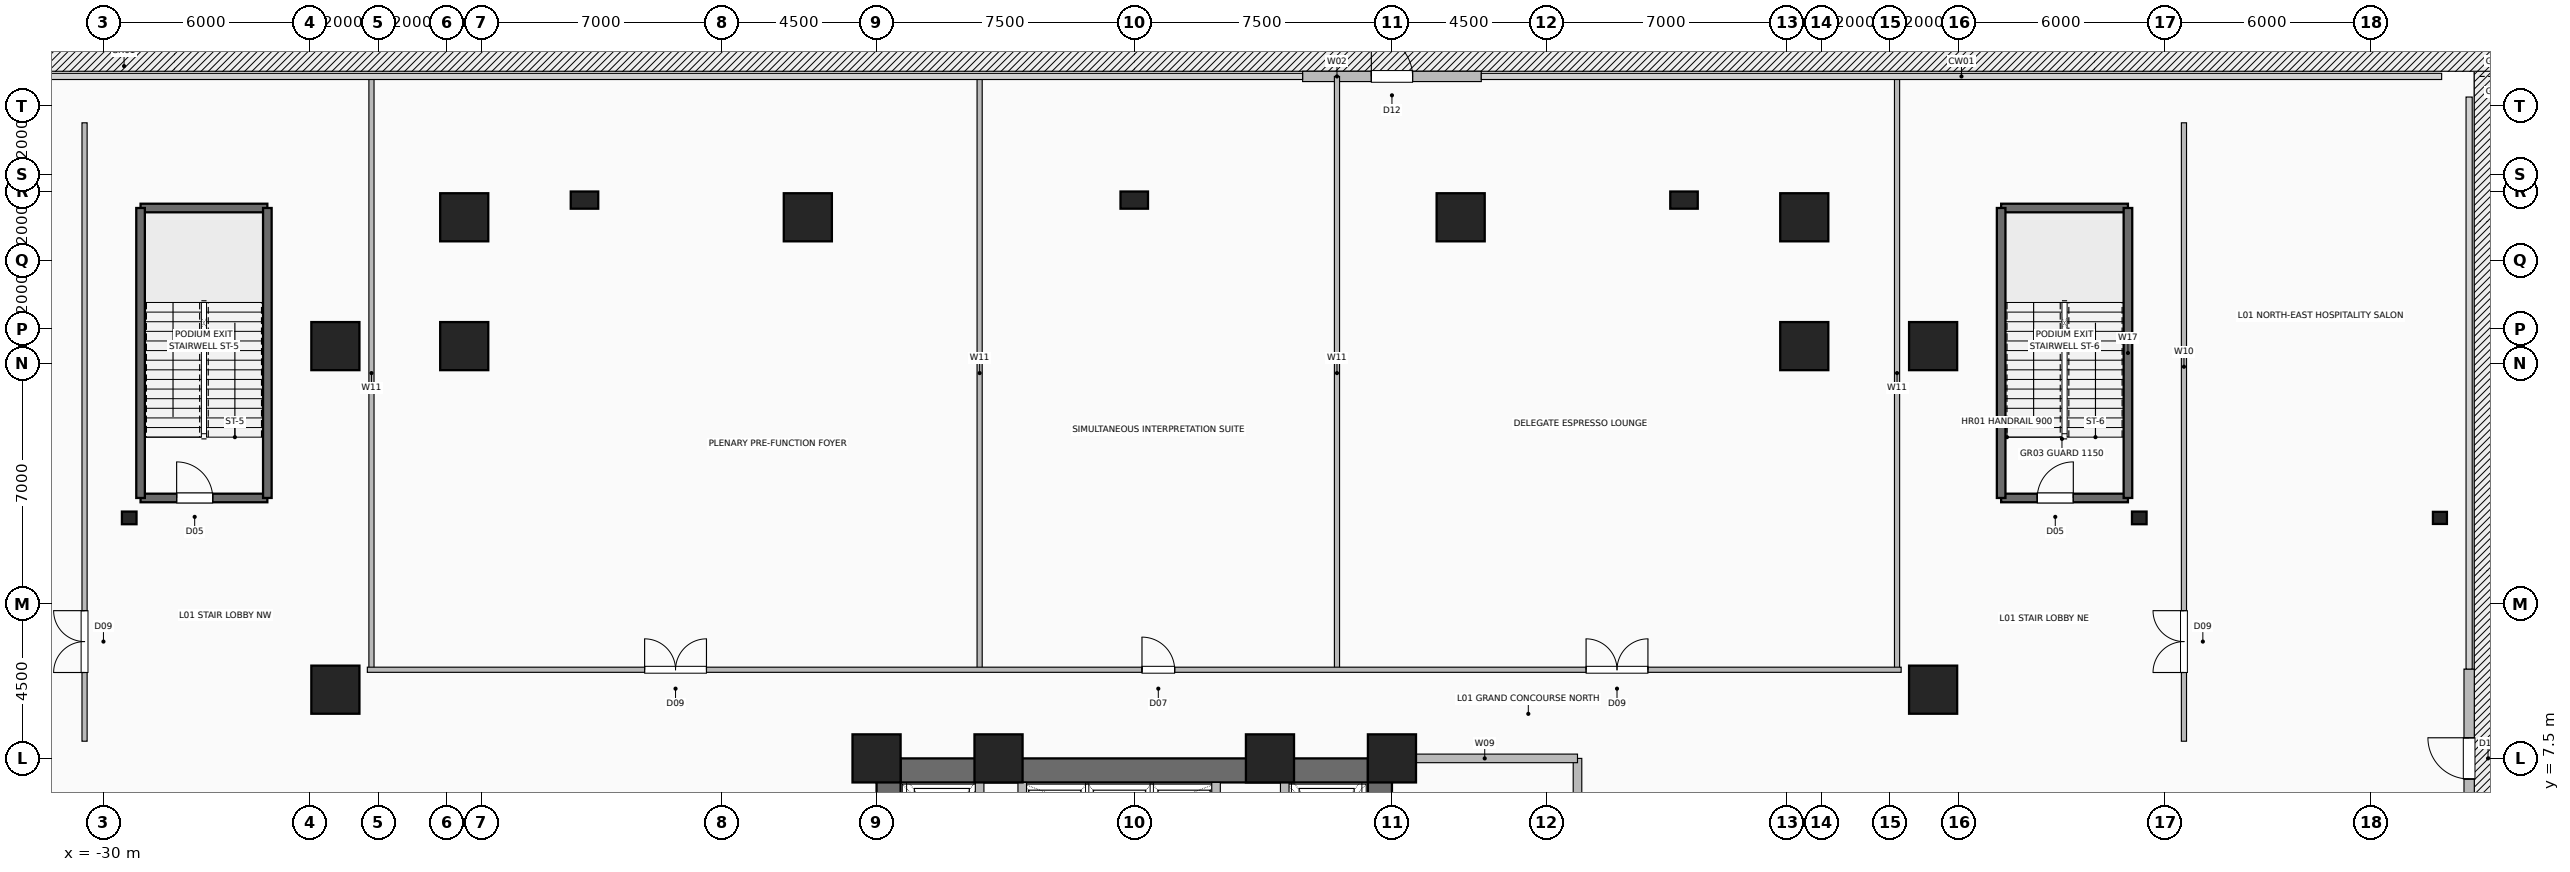
"""IFC4 building model, lengths in metres.
Left out: names, types, materials, properties, quantities, classifications, styles, units other than length and angle.
Written with IfcOpenShell. Run it as: python <this file> out.ifc"""

import sys

from ifc_helpers import new_model, si_unit, direction, frame, frame_2d, origin, origin_2d, place, context, subcontext, project, spatial, rectangle, hollow_rectangle, i_section, extrude, element, fill, save


model = new_model("IFC4")
c1 = context("Model", 3, precision=1e-05, world=origin(), true_north=direction((0.0, 1.0)))
c2 = subcontext(c1, "Body", "Model", "MODEL_VIEW")
j1 = project(units=[si_unit("LENGTHUNIT", "METRE"), si_unit("PLANEANGLEUNIT", "RADIAN")], contexts=[c1])
p1 = place(None, origin())
s1 = spatial("IfcSite", under=j1, at=p1, CompositionType="ELEMENT")
p2 = place(p1, origin())
s2 = spatial("IfcBuilding", under=s1, at=p2, CompositionType="ELEMENT")
p3 = place(p2, frame((0.0, 0.0, 5.4)))
s3 = spatial("IfcBuildingStorey", under=s2, at=p3, CompositionType="ELEMENT", Elevation=5.4)
for number, where, z_axis, x_axis in (
    (1, (7.5, 7.5, 0.0), (0.0, 0.0, 1.0), (1.0, 0.0, 0.0)),
    (2, (3.95, 7.5, 0.0), (0.0, 0.0, 1.0), (1.0, 0.0, 0.0)),
    (3, (-3.95, 7.5, 0.0), (0.0, 0.0, 1.0), (1.0, 0.0, 0.0)),
    (4, (-7.5, 7.5, 0.0), (0.0, 0.0, 1.0), (1.0, 0.0, 0.0)),
    (5, (-19.5, 23.25, 0.0), (0.0, 0.0, 1.0), (1.0, 0.0, 0.0)),
    (6, (-9.5, 23.25, 0.0), (0.0, 0.0, 1.0), (1.0, 0.0, 0.0)),
    (7, (9.5, 23.25, 0.0), (0.0, 0.0, 1.0), (1.0, 0.0, 0.0)),
    (8, (19.5, 23.25, 0.0), (0.0, 0.0, 1.0), (1.0, 0.0, 0.0)),
    (9, (-23.25, 9.5, 0.0), (0.0, 0.0, 1.0), (1.0, 0.0, 0.0)),
    (10, (-23.25, 19.5, 0.0), (0.0, 0.0, 1.0), (1.0, 0.0, 0.0)),
    (11, (23.25, 9.5, 0.0), (0.0, 0.0, 1.0), (1.0, 0.0, 0.0)),
    (12, (23.25, 19.5, 0.0), (0.0, 0.0, 1.0), (1.0, 0.0, 0.0)),
    (13, (19.5, 19.5, 0.0), (0.0, 0.0, 1.0), (1.0, 0.0, 0.0)),
    (14, (-19.5, 19.5, 0.0), (0.0, 0.0, 1.0), (1.0, 0.0, 0.0)),
):
    element("IfcColumn", number, at=place(p3, frame(where, z_axis=z_axis, x_axis=x_axis)), inside=s3, PredefinedType="COLUMN", context=c2, shape_type="SweptSolid", body=[
        extrude(hollow_rectangle(XDim=1.4, YDim=1.4, WallThickness=0.06, at=origin_2d()), origin(), (0.0, 0.0, 1.0), 5.4),
    ])
for number, where, z_axis, x_axis in (
    (15, (-29.25, 14.5, 0.0), (0.0, 0.0, 1.0), (1.0, 0.0, 0.0)),
    (16, (29.25, 14.5, 0.0), (0.0, 0.0, 1.0), (1.0, 0.0, 0.0)),
):
    element("IfcColumn", number, at=place(p3, frame(where, z_axis=z_axis, x_axis=x_axis)), inside=s3, PredefinedType="COLUMN", context=c2, shape_type="SweptSolid", body=[
        extrude(i_section(OverallWidth=0.368, OverallDepth=0.425, WebThickness=0.03, FlangeThickness=0.048, FilletRadius=0.02, at=origin_2d()), origin(), (0.0, 0.0, 1.0), 5.4),
    ])
p4 = place(p3, frame((38.0, 14.5, -0.4), z_axis=(0.0, 0.0, 1.0), x_axis=(1.0, 0.0, 0.0)))
e17 = element("IfcColumn", 17, at=p4, inside=s3, PredefinedType="COLUMN", context=c2, shape_type="SweptSolid", body=[
    extrude(i_section(OverallWidth=0.352, OverallDepth=0.407, WebThickness=0.025, FlangeThickness=0.04, FilletRadius=0.02, at=origin_2d()), origin(), (0.0, 0.0, 1.0), 5.4),
])
for number, where, z_axis, x_axis in (
    (18, (-16.0, 23.75, 0.0), (0.0, 0.0, 1.0), (1.0, 0.0, 0.0)),
    (19, (0.0, 23.75, 0.0), (0.0, 0.0, 1.0), (1.0, 0.0, 0.0)),
    (20, (16.0, 23.75, 0.0), (0.0, 0.0, 1.0), (1.0, 0.0, 0.0)),
):
    element("IfcColumn", number, at=place(p3, frame(where, z_axis=z_axis, x_axis=x_axis)), inside=s3, PredefinedType="PILASTER", context=c2, shape_type="SweptSolid", body=[
        extrude(rectangle(XDim=0.5, YDim=0.8, at=origin_2d()), origin(), (0.0, 0.0, 1.0), 5.4),
    ])
p5 = place(p3, frame((38.85, 4.9, 0.0), z_axis=(0.0, 0.0, 1.0), x_axis=(0.0, 1.0, 0.0)))
e21 = element("IfcWall", 21, at=p5, inside=s3, PredefinedType="SOLIDWALL", context=c2, shape_type="SweptSolid", body=[
    extrude(rectangle(XDim=5.2, YDim=0.3, at=frame_2d((2.6, 0.0))), origin(), (0.0, 0.0, 1.0), 5.0),
])
p6 = place(p5, frame((2.0, 0.0, 0.0)))
e22 = element("IfcOpeningElement", 22, at=p6, cuts=e21, PredefinedType="OPENING", context=c2, shape_type="SweptSolid", body=[
    extrude(rectangle(XDim=1.2, YDim=2.25, at=frame_2d((0.6, 1.125))), frame((0.0, 0.16, 0.0), z_axis=(0.0, -1.0, 0.0), x_axis=(1.0, 0.0, 0.0)), (0.0, 0.0, 1.0), 0.32),
])
p7 = place(p3, frame((4.9, 27.35, 0.0), z_axis=(0.0, 0.0, 1.0), x_axis=(1.0, 0.0, 0.0)))
e23 = element("IfcWall", 23, at=p7, inside=s3, PredefinedType="SOLIDWALL", context=c2, shape_type="SweptSolid", body=[
    extrude(rectangle(XDim=5.2, YDim=0.3, at=frame_2d((2.6, 0.0))), origin(), (0.0, 0.0, 1.0), 5.0),
])
p8 = place(p7, frame((2.0, 0.0, 0.0)))
e24 = element("IfcOpeningElement", 24, at=p8, cuts=e23, PredefinedType="OPENING", context=c2, shape_type="SweptSolid", body=[
    extrude(rectangle(XDim=1.2, YDim=2.25, at=frame_2d((0.6, 1.125))), frame((0.0, 0.16, 0.0), z_axis=(0.0, -1.0, 0.0), x_axis=(1.0, 0.0, 0.0)), (0.0, 0.0, 1.0), 0.32),
])
p9 = place(p3, frame((-7.5, 7.15, 0.0), z_axis=(0.0, 0.0, 1.0), x_axis=(1.0, 0.0, 0.0)))
e25 = element("IfcWall", 25, at=p9, inside=s3, PredefinedType="SHEAR", context=c2, shape_type="SweptSolid", body=[
    extrude(rectangle(XDim=15.0, YDim=0.7, at=frame_2d((7.5, 0.0))), origin(), (0.0, 0.0, 1.0), 5.0),
])
p10 = place(p3, frame((-7.15, -7.5, 0.0), z_axis=(0.0, 0.0, 1.0), x_axis=(0.0, 1.0, 0.0)))
e26 = element("IfcWall", 26, at=p10, inside=s3, PredefinedType="SHEAR", context=c2, shape_type="SweptSolid", body=[
    extrude(rectangle(XDim=15.0, YDim=0.7, at=frame_2d((7.5, 0.0))), origin(), (0.0, 0.0, 1.0), 5.0),
])
p11 = place(p10, frame((9.5, 0.0, 0.0)))
e27 = element("IfcOpeningElement", 27, at=p11, cuts=e26, PredefinedType="OPENING", context=c2, shape_type="SweptSolid", body=[
    extrude(rectangle(XDim=1.0, YDim=2.08, at=frame_2d((0.5, 1.04))), frame((0.0, 0.36, 0.0), z_axis=(0.0, -1.0, 0.0), x_axis=(1.0, 0.0, 0.0)), (0.0, 0.0, 1.0), 0.72),
])
p12 = place(p3, frame((7.15, -7.5, 0.0), z_axis=(0.0, 0.0, 1.0), x_axis=(0.0, 1.0, 0.0)))
e28 = element("IfcWall", 28, at=p12, inside=s3, PredefinedType="SHEAR", context=c2, shape_type="SweptSolid", body=[
    extrude(rectangle(XDim=15.0, YDim=0.7, at=frame_2d((7.5, 0.0))), origin(), (0.0, 0.0, 1.0), 5.0),
])
p13 = place(p12, frame((12.6, 0.0, 0.0)))
e29 = element("IfcOpeningElement", 29, at=p13, cuts=e28, PredefinedType="OPENING", context=c2, shape_type="SweptSolid", body=[
    extrude(rectangle(XDim=1.2, YDim=2.2, at=frame_2d((0.6, 1.1))), frame((0.0, 0.36, 0.0), z_axis=(0.0, -1.0, 0.0), x_axis=(1.0, 0.0, 0.0)), (0.0, 0.0, 1.0), 0.72),
])
for number, where, z_axis, x_axis in (
    (30, (-3.26, 4.58, 0.0), (0.0, 0.0, 1.0), (0.0, 1.0, 0.0)),
    (31, (2.38, 4.58, 0.0), (0.0, 0.0, 1.0), (0.0, 1.0, 0.0)),
):
    element("IfcWall", number, at=place(p3, frame(where, z_axis=z_axis, x_axis=x_axis)), inside=s3, PredefinedType="SHEAR", context=c2, shape_type="SweptSolid", body=[
        extrude(rectangle(XDim=2.22, YDim=0.25, at=frame_2d((1.11, 0.0))), origin(), (0.0, 0.0, 1.0), 5.0),
    ])
p14 = place(p3, frame((-4.5, 4.35, 0.0), z_axis=(0.0, 0.0, 1.0), x_axis=(0.0, 1.0, 0.0)))
e32 = element("IfcWall", 32, at=p14, inside=s3, PredefinedType="SHEAR", context=c2, shape_type="SweptSolid", body=[
    extrude(rectangle(XDim=2.85, YDim=0.25, at=frame_2d((1.425, 0.0))), origin(), (0.0, 0.0, 1.0), 5.0),
])
p15 = place(p3, frame((4.38, 4.3, 0.0), z_axis=(0.0, 0.0, 1.0), x_axis=(0.0, 1.0, 0.0)))
e33 = element("IfcWall", 33, at=p15, inside=s3, PredefinedType="SHEAR", context=c2, shape_type="SweptSolid", body=[
    extrude(rectangle(XDim=2.5, YDim=0.25, at=frame_2d((1.25, 0.0))), origin(), (0.0, 0.0, 1.0), 5.0),
])
p16 = place(p3, frame((-28.92, 15.08, 0.0), z_axis=(0.0, 0.0, 1.0), x_axis=(1.0, 0.0, 0.0)))
e34 = element("IfcWall", 34, at=p16, inside=s3, PredefinedType="SHEAR", context=c2, shape_type="SweptSolid", body=[
    extrude(rectangle(XDim=3.69, YDim=0.25, at=frame_2d((1.845, 0.0))), origin(), (0.0, 0.0, 1.0), 5.0),
])
p17 = place(p16, frame((1.05, 0.0, 0.0)))
e35 = element("IfcOpeningElement", 35, at=p17, cuts=e34, PredefinedType="OPENING", context=c2, shape_type="SweptSolid", body=[
    extrude(rectangle(XDim=1.05, YDim=2.08, at=frame_2d((0.525, 1.04))), frame((0.0, 0.135, 0.0), z_axis=(0.0, -1.0, 0.0), x_axis=(1.0, 0.0, 0.0)), (0.0, 0.0, 1.0), 0.27),
])
p18 = place(p3, frame((-28.92, 23.52, 0.0), z_axis=(0.0, 0.0, 1.0), x_axis=(1.0, 0.0, 0.0)))
e36 = element("IfcWall", 36, at=p18, inside=s3, PredefinedType="SHEAR", context=c2, shape_type="SweptSolid", body=[
    extrude(rectangle(XDim=3.69, YDim=0.25, at=frame_2d((1.845, 0.0))), origin(), (0.0, 0.0, 1.0), 5.0),
])
for number, where, z_axis, x_axis in (
    (37, (-28.92, 15.08, 0.0), (0.0, 0.0, 1.0), (0.0, 1.0, 0.0)),
    (38, (-25.23, 15.08, 0.0), (0.0, 0.0, 1.0), (0.0, 1.0, 0.0)),
):
    element("IfcWall", number, at=place(p3, frame(where, z_axis=z_axis, x_axis=x_axis)), inside=s3, PredefinedType="SHEAR", context=c2, shape_type="SweptSolid", body=[
        extrude(rectangle(XDim=8.44, YDim=0.25, at=frame_2d((4.22, 0.0))), origin(), (0.0, 0.0, 1.0), 5.0),
    ])
p19 = place(p3, frame((25.23, 15.08, 0.0), z_axis=(0.0, 0.0, 1.0), x_axis=(1.0, 0.0, 0.0)))
e39 = element("IfcWall", 39, at=p19, inside=s3, PredefinedType="SHEAR", context=c2, shape_type="SweptSolid", body=[
    extrude(rectangle(XDim=3.69, YDim=0.25, at=frame_2d((1.845, 0.0))), origin(), (0.0, 0.0, 1.0), 5.0),
])
p20 = place(p19, frame((1.05, 0.0, 0.0)))
e40 = element("IfcOpeningElement", 40, at=p20, cuts=e39, PredefinedType="OPENING", context=c2, shape_type="SweptSolid", body=[
    extrude(rectangle(XDim=1.05, YDim=2.08, at=frame_2d((0.525, 1.04))), frame((0.0, 0.135, 0.0), z_axis=(0.0, -1.0, 0.0), x_axis=(1.0, 0.0, 0.0)), (0.0, 0.0, 1.0), 0.27),
])
p21 = place(p3, frame((25.23, 23.52, 0.0), z_axis=(0.0, 0.0, 1.0), x_axis=(1.0, 0.0, 0.0)))
e41 = element("IfcWall", 41, at=p21, inside=s3, PredefinedType="SHEAR", context=c2, shape_type="SweptSolid", body=[
    extrude(rectangle(XDim=3.69, YDim=0.25, at=frame_2d((1.845, 0.0))), origin(), (0.0, 0.0, 1.0), 5.0),
])
for number, where, z_axis, x_axis in (
    (42, (25.23, 15.08, 0.0), (0.0, 0.0, 1.0), (0.0, 1.0, 0.0)),
    (43, (28.92, 15.08, 0.0), (0.0, 0.0, 1.0), (0.0, 1.0, 0.0)),
):
    element("IfcWall", number, at=place(p3, frame(where, z_axis=z_axis, x_axis=x_axis)), inside=s3, PredefinedType="SHEAR", context=c2, shape_type="SweptSolid", body=[
        extrude(rectangle(XDim=8.44, YDim=0.25, at=frame_2d((4.22, 0.0))), origin(), (0.0, 0.0, 1.0), 5.0),
    ])
p22 = place(p3, frame((12.9, 1.75, 0.0), z_axis=(0.0, 0.0, 1.0), x_axis=(0.0, 1.0, 0.0)))
e44 = element("IfcWall", 44, at=p22, inside=s3, PredefinedType="SHEAR", context=c2, shape_type="SweptSolid", body=[
    extrude(rectangle(XDim=5.75, YDim=0.25, at=frame_2d((2.875, 0.0))), origin(), (0.0, 0.0, 1.0), 5.0),
])
p23 = place(p22, frame((1.8, 0.0, 0.0)))
e45 = element("IfcOpeningElement", 45, at=p23, cuts=e44, PredefinedType="OPENING", context=c2, shape_type="SweptSolid", body=[
    extrude(rectangle(XDim=1.0, YDim=2.08, at=frame_2d((0.5, 1.04))), frame((0.0, 0.135, 0.0), z_axis=(0.0, -1.0, 0.0), x_axis=(1.0, 0.0, 0.0)), (0.0, 0.0, 1.0), 0.27),
])
p24 = place(p3, frame((7.5, 7.5, 0.0), z_axis=(0.0, 0.0, 1.0), x_axis=(1.0, 0.0, 0.0)))
e46 = element("IfcWall", 46, at=p24, inside=s3, PredefinedType="SHEAR", context=c2, shape_type="SweptSolid", body=[
    extrude(rectangle(XDim=5.4, YDim=0.25, at=frame_2d((2.7, 0.0))), origin(), (0.0, 0.0, 1.0), 5.0),
])
for number, where, z_axis, x_axis in (
    (47, (-22.2, 10.08, 0.0), (0.0, 0.0, 1.0), (0.0, 1.0, 0.0)),
    (48, (-4.5, 10.08, 0.0), (0.0, 0.0, 1.0), (0.0, 1.0, 0.0)),
):
    element("IfcWall", number, at=place(p3, frame(where, z_axis=z_axis, x_axis=x_axis)), inside=s3, PredefinedType="PARTITIONING", context=c2, shape_type="SweptSolid", body=[
        extrude(rectangle(XDim=17.27, YDim=0.15, at=frame_2d((8.635, 0.0))), origin(), (0.0, 0.0, 1.0), 5.0),
    ])
p25 = place(p3, frame((5.9, 10.08, 0.0), z_axis=(0.0, 0.0, 1.0), x_axis=(0.0, 1.0, 0.0)))
e49 = element("IfcWall", 49, at=p25, inside=s3, PredefinedType="PARTITIONING", context=c2, shape_type="SweptSolid", body=[
    extrude(rectangle(XDim=17.27, YDim=0.15, at=frame_2d((8.635, 0.0))), origin(), (0.0, 0.0, 1.0), 4.518),
])
p26 = place(p3, frame((22.2, 10.08, 0.0), z_axis=(0.0, 0.0, 1.0), x_axis=(0.0, 1.0, 0.0)))
e50 = element("IfcWall", 50, at=p26, inside=s3, PredefinedType="PARTITIONING", context=c2, shape_type="SweptSolid", body=[
    extrude(rectangle(XDim=17.27, YDim=0.15, at=frame_2d((8.635, 0.0))), origin(), (0.0, 0.0, 1.0), 5.0),
])
p27 = place(p3, frame((-22.32, 10.08, 0.0), z_axis=(0.0, 0.0, 1.0), x_axis=(1.0, 0.0, 0.0)))
e51 = element("IfcWall", 51, at=p27, inside=s3, PredefinedType="PARTITIONING", context=c2, shape_type="SweptSolid", body=[
    extrude(rectangle(XDim=44.64, YDim=0.15, at=frame_2d((22.32, 0.0))), origin(), (0.0, 0.0, 1.0), 5.0),
])
p28 = place(p27, frame((8.07, 0.0, 0.0)))
e52 = element("IfcOpeningElement", 52, at=p28, cuts=e51, PredefinedType="OPENING", context=c2, shape_type="SweptSolid", body=[
    extrude(rectangle(XDim=1.8, YDim=2.08, at=frame_2d((0.9, 1.04))), frame((0.0, 0.085, 0.0), z_axis=(0.0, -1.0, 0.0), x_axis=(1.0, 0.0, 0.0)), (0.0, 0.0, 1.0), 0.17),
])
p29 = place(p27, frame((22.545, 0.0, 0.0)))
e53 = element("IfcOpeningElement", 53, at=p29, cuts=e51, PredefinedType="OPENING", context=c2, shape_type="SweptSolid", body=[
    extrude(rectangle(XDim=0.95, YDim=2.06, at=frame_2d((0.475, 1.03))), frame((0.0, 0.085, 0.0), z_axis=(0.0, -1.0, 0.0), x_axis=(1.0, 0.0, 0.0)), (0.0, 0.0, 1.0), 0.17),
])
p30 = place(p27, frame((35.47, 0.0, 0.0)))
e54 = element("IfcOpeningElement", 54, at=p30, cuts=e51, PredefinedType="OPENING", context=c2, shape_type="SweptSolid", body=[
    extrude(rectangle(XDim=1.8, YDim=2.08, at=frame_2d((0.9, 1.04))), frame((0.0, 0.085, 0.0), z_axis=(0.0, -1.0, 0.0), x_axis=(1.0, 0.0, 0.0)), (0.0, 0.0, 1.0), 0.17),
])
p31 = place(p3, frame((-30.55, 8.0, 0.0), z_axis=(0.0, 0.0, 1.0), x_axis=(0.0, 1.0, 0.0)))
e55 = element("IfcWall", 55, at=p31, inside=s3, PredefinedType="PARTITIONING", context=c2, shape_type="SweptSolid", body=[
    extrude(rectangle(XDim=18.0, YDim=0.15, at=frame_2d((9.0, 0.0))), origin(), (0.0, 0.0, 1.0), 5.0),
])
p32 = place(p31, frame((2.0, 0.0, 0.0)))
e56 = element("IfcOpeningElement", 56, at=p32, cuts=e55, PredefinedType="OPENING", context=c2, shape_type="SweptSolid", body=[
    extrude(rectangle(XDim=1.8, YDim=2.08, at=frame_2d((0.9, 1.04))), frame((0.0, 0.085, 0.0), z_axis=(0.0, -1.0, 0.0), x_axis=(1.0, 0.0, 0.0)), (0.0, 0.0, 1.0), 0.17),
])
p33 = place(p3, frame((30.55, 8.0, 0.0), z_axis=(0.0, 0.0, 1.0), x_axis=(0.0, 1.0, 0.0)))
e57 = element("IfcWall", 57, at=p33, inside=s3, PredefinedType="PARTITIONING", context=c2, shape_type="SweptSolid", body=[
    extrude(rectangle(XDim=18.0, YDim=0.15, at=frame_2d((9.0, 0.0))), origin(), (0.0, 0.0, 1.0), 5.0),
])
p34 = place(p33, frame((2.0, 0.0, 0.0)))
e58 = element("IfcOpeningElement", 58, at=p34, cuts=e57, PredefinedType="OPENING", context=c2, shape_type="SweptSolid", body=[
    extrude(rectangle(XDim=1.8, YDim=2.08, at=frame_2d((0.9, 1.04))), frame((0.0, 0.085, 0.0), z_axis=(0.0, -1.0, 0.0), x_axis=(1.0, 0.0, 0.0)), (0.0, 0.0, 1.0), 0.17),
])
p35 = place(p6, origin())
e59 = element("IfcDoor", 59, at=p35, inside=s3, OperationType="SINGLE_SWING_RIGHT", PredefinedType="DOOR", context=c2, shape_type="SweptSolid", body=[
    extrude(rectangle(XDim=1.2, YDim=2.25, at=frame_2d((0.6, 1.125))), frame((0.0, 0.025, 0.0), z_axis=(0.0, -1.0, 0.0), x_axis=(1.0, 0.0, 0.0)), (0.0, 0.0, 1.0), 0.05),
])
fill(e22, e59)
p36 = place(p8, origin())
e60 = element("IfcDoor", 60, at=p36, inside=s3, OperationType="SINGLE_SWING_LEFT", PredefinedType="DOOR", context=c2, shape_type="SweptSolid", body=[
    extrude(rectangle(XDim=1.2, YDim=2.25, at=frame_2d((0.6, 1.125))), frame((0.0, 0.025, 0.0), z_axis=(0.0, -1.0, 0.0), x_axis=(1.0, 0.0, 0.0)), (0.0, 0.0, 1.0), 0.05),
])
fill(e24, e60)
p37 = place(p17, origin())
e61 = element("IfcDoor", 61, at=p37, inside=s3, OperationType="SINGLE_SWING_LEFT", PredefinedType="DOOR", context=c2, shape_type="SweptSolid", body=[
    extrude(rectangle(XDim=1.05, YDim=2.08, at=frame_2d((0.525, 1.04))), frame((0.0, 0.025, 0.0), z_axis=(0.0, -1.0, 0.0), x_axis=(1.0, 0.0, 0.0)), (0.0, 0.0, 1.0), 0.05),
])
fill(e35, e61)
p38 = place(p20, origin())
e62 = element("IfcDoor", 62, at=p38, inside=s3, OperationType="SINGLE_SWING_RIGHT", PredefinedType="DOOR", context=c2, shape_type="SweptSolid", body=[
    extrude(rectangle(XDim=1.05, YDim=2.08, at=frame_2d((0.525, 1.04))), frame((0.0, 0.025, 0.0), z_axis=(0.0, -1.0, 0.0), x_axis=(1.0, 0.0, 0.0)), (0.0, 0.0, 1.0), 0.05),
])
fill(e40, e62)
p39 = place(p28, origin())
e63 = element("IfcDoor", 63, at=p39, inside=s3, OperationType="DOUBLE_DOOR_SINGLE_SWING", PredefinedType="DOOR", context=c2, shape_type="SweptSolid", body=[
    extrude(rectangle(XDim=1.8, YDim=2.08, at=frame_2d((0.9, 1.04))), frame((0.0, 0.025, 0.0), z_axis=(0.0, -1.0, 0.0), x_axis=(1.0, 0.0, 0.0)), (0.0, 0.0, 1.0), 0.05),
])
fill(e52, e63)
p40 = place(p29, origin())
e64 = element("IfcDoor", 64, at=p40, inside=s3, OperationType="SINGLE_SWING_LEFT", PredefinedType="DOOR", context=c2, shape_type="SweptSolid", body=[
    extrude(rectangle(XDim=0.95, YDim=2.06, at=frame_2d((0.475, 1.03))), frame((0.0, 0.025, 0.0), z_axis=(0.0, -1.0, 0.0), x_axis=(1.0, 0.0, 0.0)), (0.0, 0.0, 1.0), 0.05),
])
fill(e53, e64)
p41 = place(p30, origin())
e65 = element("IfcDoor", 65, at=p41, inside=s3, OperationType="DOUBLE_DOOR_SINGLE_SWING", PredefinedType="DOOR", context=c2, shape_type="SweptSolid", body=[
    extrude(rectangle(XDim=1.8, YDim=2.08, at=frame_2d((0.9, 1.04))), frame((0.0, 0.025, 0.0), z_axis=(0.0, -1.0, 0.0), x_axis=(1.0, 0.0, 0.0)), (0.0, 0.0, 1.0), 0.05),
])
fill(e54, e65)
p42 = place(p32, origin())
e66 = element("IfcDoor", 66, at=p42, inside=s3, OperationType="DOUBLE_DOOR_SINGLE_SWING", PredefinedType="DOOR", context=c2, shape_type="SweptSolid", body=[
    extrude(rectangle(XDim=1.8, YDim=2.08, at=frame_2d((0.9, 1.04))), frame((0.0, 0.025, 0.0), z_axis=(0.0, -1.0, 0.0), x_axis=(1.0, 0.0, 0.0)), (0.0, 0.0, 1.0), 0.05),
])
fill(e56, e66)
p43 = place(p34, origin())
e67 = element("IfcDoor", 67, at=p43, inside=s3, OperationType="DOUBLE_DOOR_SINGLE_SWING", PredefinedType="DOOR", context=c2, shape_type="SweptSolid", body=[
    extrude(rectangle(XDim=1.8, YDim=2.08, at=frame_2d((0.9, 1.04))), frame((0.0, 0.025, 0.0), z_axis=(0.0, -1.0, 0.0), x_axis=(1.0, 0.0, 0.0)), (0.0, 0.0, 1.0), 0.05),
])
fill(e58, e67)
save(model, sys.argv[1])
